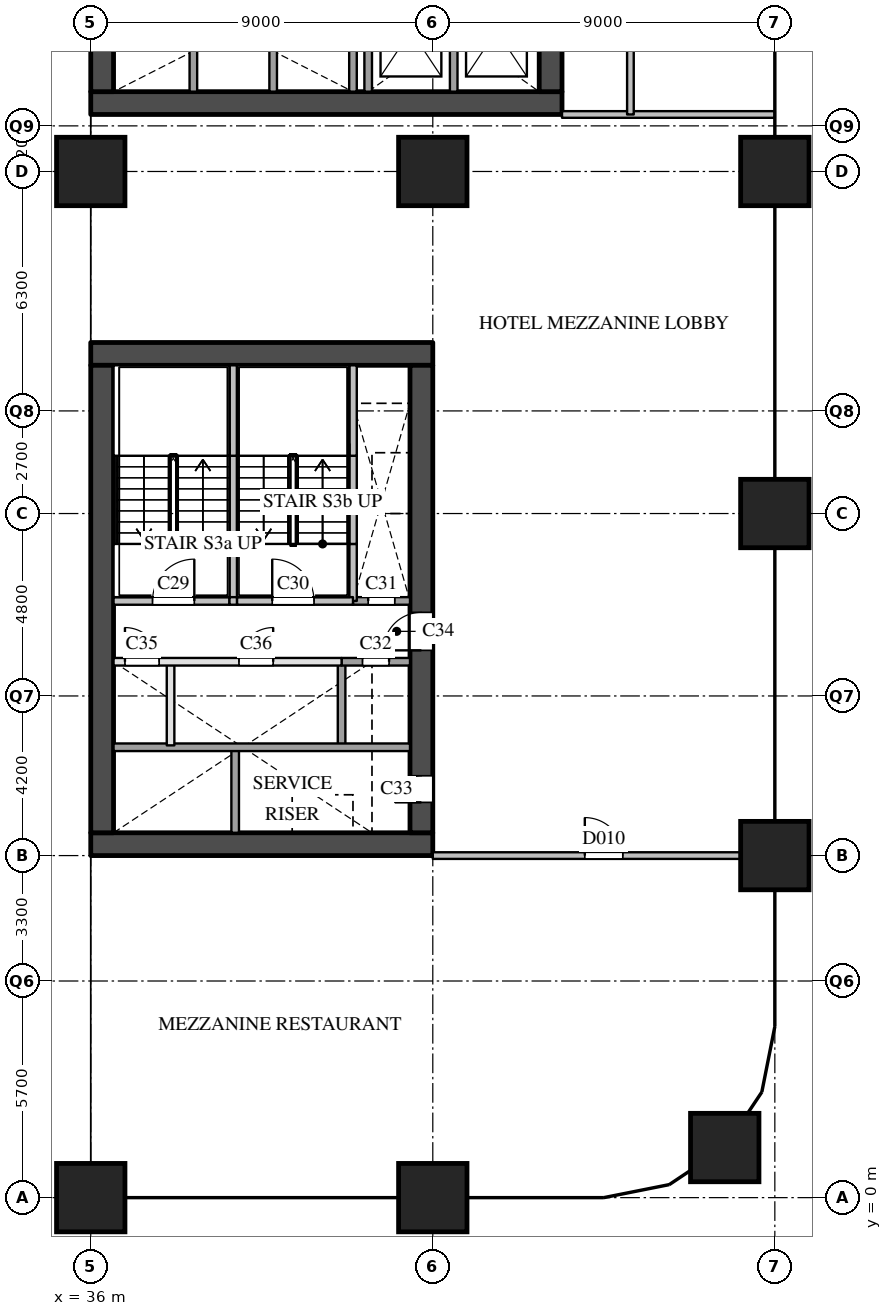
"""IFC4 building model, lengths in metres.
Left out: names, types, materials, properties, quantities, classifications, styles, units other than length and angle.
Written with IfcOpenShell. Run it as: python <this file> out.ifc"""

import sys

from ifc_helpers import new_model, si_unit, direction, frame, frame_2d, origin, origin_2d, place, context, subcontext, project, spatial, rectangle, extrude, element, fill, save


model = new_model("IFC4")
c1 = context("Model", 3, precision=1e-05, world=origin(), true_north=direction((0.0, 1.0)))
c2 = subcontext(c1, "Body", "Model", "MODEL_VIEW")
j1 = project(units=[si_unit("LENGTHUNIT", "METRE"), si_unit("PLANEANGLEUNIT", "RADIAN")], contexts=[c1])
p1 = place(None, origin())
s1 = spatial("IfcSite", under=j1, at=p1, CompositionType="ELEMENT")
p2 = place(p1, origin())
s2 = spatial("IfcBuilding", under=s1, at=p2, CompositionType="ELEMENT")
p3 = place(p2, frame((0.0, 0.0, 8.0)))
s3 = spatial("IfcBuildingStorey", under=s2, at=p3, CompositionType="ELEMENT", Elevation=8.0)
for number, where, z_axis, x_axis in (
    (1, (36.0, 0.0, 0.0), (0.0, 0.0, 1.0), (1.0, 0.0, 0.0)),
    (2, (36.0, 27.0, 0.0), (0.0, 0.0, 1.0), (1.0, 0.0, 0.0)),
    (3, (45.0, 0.0, 0.0), (0.0, 0.0, 1.0), (1.0, 0.0, 0.0)),
    (4, (45.0, 27.0, 0.0), (0.0, 0.0, 1.0), (1.0, 0.0, 0.0)),
    (5, (52.682, 1.318, 0.0), (0.0, 0.0, 1.0), (1.0, 0.0, 0.0)),
    (6, (54.0, 9.0, 0.0), (0.0, 0.0, 1.0), (1.0, 0.0, 0.0)),
    (7, (54.0, 18.0, 0.0), (0.0, 0.0, 1.0), (1.0, 0.0, 0.0)),
    (8, (54.0, 27.0, 0.0), (0.0, 0.0, 1.0), (1.0, 0.0, 0.0)),
):
    element("IfcColumn", number, at=place(p3, frame(where, z_axis=z_axis, x_axis=x_axis)), inside=s3, PredefinedType="COLUMN", context=c2, shape_type="SweptSolid", body=[
        extrude(rectangle(XDim=1.8, YDim=1.8, at=origin_2d()), origin(), (0.0, 0.0, 1.0), 6.0),
    ])
p4 = place(p3, frame((36.0, 28.8, 0.0), z_axis=(0.0, 0.0, 1.0), x_axis=(1.0, 0.0, 0.0)))
e9 = element("IfcWall", 9, at=p4, inside=s3, PredefinedType="SHEAR", context=c2, shape_type="SweptSolid", body=[
    extrude(rectangle(XDim=12.4, YDim=0.6, at=frame_2d((6.2, 0.0))), origin(), (0.0, 0.0, 1.0), 5.59),
])
p5 = place(p3, frame((36.3, 29.1, 0.0), z_axis=(0.0, 0.0, 1.0), x_axis=(0.0, 1.0, 0.0)))
e10 = element("IfcWall", 10, at=p5, inside=s3, PredefinedType="SHEAR", context=c2, shape_type="SweptSolid", body=[
    extrude(rectangle(XDim=20.3, YDim=0.6, at=frame_2d((10.15, 0.0))), origin(), (0.0, 0.0, 1.0), 5.59),
])
p6 = place(p3, frame((48.1, 29.1, 0.0), z_axis=(0.0, 0.0, 1.0), x_axis=(0.0, 1.0, 0.0)))
e11 = element("IfcWall", 11, at=p6, inside=s3, PredefinedType="SHEAR", context=c2, shape_type="SweptSolid", body=[
    extrude(rectangle(XDim=20.3, YDim=0.6, at=frame_2d((10.15, 0.0))), origin(), (0.0, 0.0, 1.0), 5.59),
])
p7 = place(p6, frame((12.5, 0.0, 0.0)))
e12 = element("IfcOpeningElement", 12, at=p7, cuts=e11, PredefinedType="OPENING", context=c2, shape_type="SweptSolid", body=[
    extrude(rectangle(XDim=0.7, YDim=2.1, at=frame_2d((0.35, 1.05))), frame((0.0, 0.31, 0.0), z_axis=(0.0, -1.0, 0.0), x_axis=(1.0, 0.0, 0.0)), (0.0, 0.0, 1.0), 0.62),
])
p8 = place(p6, frame((3.9, 0.0, 0.0)))
e13 = element("IfcOpeningElement", 13, at=p8, cuts=e11, PredefinedType="OPENING", context=c2, shape_type="SweptSolid", body=[
    extrude(rectangle(XDim=1.8, YDim=2.1, at=frame_2d((0.9, 1.05))), frame((0.0, 0.31, 0.0), z_axis=(0.0, -1.0, 0.0), x_axis=(1.0, 0.0, 0.0)), (0.0, 0.0, 1.0), 0.62),
])
p9 = place(p6, frame((16.4, 0.0, 0.0)))
e14 = element("IfcOpeningElement", 14, at=p9, cuts=e11, PredefinedType="OPENING", context=c2, shape_type="SweptSolid", body=[
    extrude(rectangle(XDim=1.0, YDim=2.1, at=frame_2d((0.5, 1.05))), frame((0.0, 0.31, 0.0), z_axis=(0.0, -1.0, 0.0), x_axis=(1.0, 0.0, 0.0)), (0.0, 0.0, 1.0), 0.62),
])
for number, where, z_axis, x_axis in (
    (15, (38.7, 29.1, 0.0), (0.0, 0.0, 1.0), (0.0, 1.0, 0.0)),
    (16, (40.8, 29.1, 0.0), (0.0, 0.0, 1.0), (0.0, 1.0, 0.0)),
    (17, (42.9, 29.1, 0.0), (0.0, 0.0, 1.0), (0.0, 1.0, 0.0)),
):
    element("IfcWall", number, at=place(p3, frame(where, z_axis=z_axis, x_axis=x_axis)), inside=s3, PredefinedType="SOLIDWALL", context=c2, shape_type="SweptSolid", body=[
        extrude(rectangle(XDim=3.2, YDim=0.2, at=frame_2d((1.6, 0.0))), origin(), (0.0, 0.0, 1.0), 5.59),
    ])
p10 = place(p3, frame((43.3, 29.1, 0.0), z_axis=(0.0, 0.0, 1.0), x_axis=(0.0, 1.0, 0.0)))
e18 = element("IfcWall", 18, at=p10, inside=s3, PredefinedType="SOLIDWALL", context=c2, shape_type="SweptSolid", body=[
    extrude(rectangle(XDim=9.9, YDim=0.2, at=frame_2d((4.95, 0.0))), origin(), (0.0, 0.0, 1.0), 5.59),
])
p11 = place(p10, frame((3.6, 0.0, 0.0)))
e19 = element("IfcOpeningElement", 19, at=p11, cuts=e18, PredefinedType="OPENING", context=c2, shape_type="SweptSolid", body=[
    extrude(rectangle(XDim=1.8, YDim=2.1, at=frame_2d((0.9, 1.05))), frame((0.0, 0.11, 0.0), z_axis=(0.0, -1.0, 0.0), x_axis=(1.0, 0.0, 0.0)), (0.0, 0.0, 1.0), 0.22),
])
p12 = place(p3, frame((45.55, 29.1, 0.0), z_axis=(0.0, 0.0, 1.0), x_axis=(0.0, 1.0, 0.0)))
e20 = element("IfcWall", 20, at=p12, inside=s3, PredefinedType="SOLIDWALL", context=c2, shape_type="SweptSolid", body=[
    extrude(rectangle(XDim=3.2, YDim=0.2, at=frame_2d((1.6, 0.0))), origin(), (0.0, 0.0, 1.0), 5.59),
])
for number, where, z_axis, x_axis in (
    (21, (36.0, 9.3, 0.0), (0.0, 0.0, 1.0), (1.0, 0.0, 0.0)),
    (22, (36.0, 22.2, 0.0), (0.0, 0.0, 1.0), (1.0, 0.0, 0.0)),
):
    element("IfcWall", number, at=place(p3, frame(where, z_axis=z_axis, x_axis=x_axis)), inside=s3, PredefinedType="SHEAR", context=c2, shape_type="SweptSolid", body=[
        extrude(rectangle(XDim=9.0, YDim=0.6, at=frame_2d((4.5, 0.0))), origin(), (0.0, 0.0, 1.0), 5.59),
    ])
p13 = place(p3, frame((36.3, 9.6, 0.0), z_axis=(0.0, 0.0, 1.0), x_axis=(0.0, 1.0, 0.0)))
e23 = element("IfcWall", 23, at=p13, inside=s3, PredefinedType="SHEAR", context=c2, shape_type="SweptSolid", body=[
    extrude(rectangle(XDim=12.3, YDim=0.6, at=frame_2d((6.15, 0.0))), origin(), (0.0, 0.0, 1.0), 5.59),
])
p14 = place(p3, frame((44.7, 9.6, 0.0), z_axis=(0.0, 0.0, 1.0), x_axis=(0.0, 1.0, 0.0)))
e24 = element("IfcWall", 24, at=p14, inside=s3, PredefinedType="SHEAR", context=c2, shape_type="SweptSolid", body=[
    extrude(rectangle(XDim=12.3, YDim=0.6, at=frame_2d((6.15, 0.0))), origin(), (0.0, 0.0, 1.0), 5.59),
])
p15 = place(p14, frame((0.8, 0.0, 0.0)))
e25 = element("IfcOpeningElement", 25, at=p15, cuts=e24, PredefinedType="OPENING", context=c2, shape_type="SweptSolid", body=[
    extrude(rectangle(XDim=0.7, YDim=2.1, at=frame_2d((0.35, 1.05))), frame((0.0, 0.31, 0.0), z_axis=(0.0, -1.0, 0.0), x_axis=(1.0, 0.0, 0.0)), (0.0, 0.0, 1.0), 0.62),
])
p16 = place(p14, frame((4.8, 0.0, 0.0)))
e26 = element("IfcOpeningElement", 26, at=p16, cuts=e24, PredefinedType="OPENING", context=c2, shape_type="SweptSolid", body=[
    extrude(rectangle(XDim=1.0, YDim=2.1, at=frame_2d((0.5, 1.05))), frame((0.0, 0.31, 0.0), z_axis=(0.0, -1.0, 0.0), x_axis=(1.0, 0.0, 0.0)), (0.0, 0.0, 1.0), 0.62),
])
p17 = place(p3, frame((38.1, 11.9, 0.0), z_axis=(0.0, 0.0, 1.0), x_axis=(0.0, 1.0, 0.0)))
e27 = element("IfcWall", 27, at=p17, inside=s3, PredefinedType="PARTITIONING", context=c2, shape_type="SweptSolid", body=[
    extrude(rectangle(XDim=2.2, YDim=0.2, at=frame_2d((1.1, 0.0))), origin(), (0.0, 0.0, 1.0), 5.59),
])
p18 = place(p3, frame((39.75, 15.7, 0.0), z_axis=(0.0, 0.0, 1.0), x_axis=(0.0, 1.0, 0.0)))
e28 = element("IfcWall", 28, at=p18, inside=s3, PredefinedType="SOLIDWALL", context=c2, shape_type="SweptSolid", body=[
    extrude(rectangle(XDim=1.5, YDim=0.2, at=frame_2d((0.75, 0.0))), origin(), (0.0, 0.0, 1.0), 5.59),
])
p19 = place(p3, frame((39.75, 17.2, 0.0), z_axis=(0.0, 0.0, 1.0), x_axis=(0.0, 1.0, 0.0)))
e29 = element("IfcWall", 29, at=p19, inside=s3, PredefinedType="SOLIDWALL", context=c2, shape_type="SweptSolid", body=[
    extrude(rectangle(XDim=2.32, YDim=0.2, at=frame_2d((1.16, 0.0))), origin(), (0.0, 0.0, 1.0), 5.59),
])
p20 = place(p3, frame((39.75, 19.52, 0.0), z_axis=(0.0, 0.0, 1.0), x_axis=(0.0, 1.0, 0.0)))
e30 = element("IfcWall", 30, at=p20, inside=s3, PredefinedType="SOLIDWALL", context=c2, shape_type="SweptSolid", body=[
    extrude(rectangle(XDim=2.38, YDim=0.2, at=frame_2d((1.19, 0.0))), origin(), (0.0, 0.0, 1.0), 5.59),
])
p21 = place(p3, frame((39.8, 9.6, 0.0), z_axis=(0.0, 0.0, 1.0), x_axis=(0.0, 1.0, 0.0)))
e31 = element("IfcWall", 31, at=p21, inside=s3, PredefinedType="SOLIDWALL", context=c2, shape_type="SweptSolid", body=[
    extrude(rectangle(XDim=2.3, YDim=0.2, at=frame_2d((1.15, 0.0))), origin(), (0.0, 0.0, 1.0), 5.59),
])
p22 = place(p3, frame((42.6, 11.9, 0.0), z_axis=(0.0, 0.0, 1.0), x_axis=(0.0, 1.0, 0.0)))
e32 = element("IfcWall", 32, at=p22, inside=s3, PredefinedType="SOLIDWALL", context=c2, shape_type="SweptSolid", body=[
    extrude(rectangle(XDim=2.2, YDim=0.2, at=frame_2d((1.1, 0.0))), origin(), (0.0, 0.0, 1.0), 5.59),
])
p23 = place(p3, frame((42.9, 15.7, 0.0), z_axis=(0.0, 0.0, 1.0), x_axis=(0.0, 1.0, 0.0)))
e33 = element("IfcWall", 33, at=p23, inside=s3, PredefinedType="SOLIDWALL", context=c2, shape_type="SweptSolid", body=[
    extrude(rectangle(XDim=1.5, YDim=0.2, at=frame_2d((0.75, 0.0))), origin(), (0.0, 0.0, 1.0), 5.59),
])
p24 = place(p3, frame((42.9, 17.2, 0.0), z_axis=(0.0, 0.0, 1.0), x_axis=(0.0, 1.0, 0.0)))
e34 = element("IfcWall", 34, at=p24, inside=s3, PredefinedType="SOLIDWALL", context=c2, shape_type="SweptSolid", body=[
    extrude(rectangle(XDim=2.32, YDim=0.2, at=frame_2d((1.16, 0.0))), origin(), (0.0, 0.0, 1.0), 5.59),
])
p25 = place(p3, frame((42.9, 19.52, 0.0), z_axis=(0.0, 0.0, 1.0), x_axis=(0.0, 1.0, 0.0)))
e35 = element("IfcWall", 35, at=p25, inside=s3, PredefinedType="SOLIDWALL", context=c2, shape_type="SweptSolid", body=[
    extrude(rectangle(XDim=2.38, YDim=0.2, at=frame_2d((1.19, 0.0))), origin(), (0.0, 0.0, 1.0), 5.59),
])
p26 = place(p3, frame((36.6, 11.85, 0.0), z_axis=(0.0, 0.0, 1.0), x_axis=(1.0, 0.0, 0.0)))
e36 = element("IfcWall", 36, at=p26, inside=s3, PredefinedType="SOLIDWALL", context=c2, shape_type="SweptSolid", body=[
    extrude(rectangle(XDim=7.8, YDim=0.2, at=frame_2d((3.9, 0.0))), origin(), (0.0, 0.0, 1.0), 5.59),
])
p27 = place(p3, frame((36.6, 14.1, 0.0), z_axis=(0.0, 0.0, 1.0), x_axis=(1.0, 0.0, 0.0)))
e37 = element("IfcWall", 37, at=p27, inside=s3, PredefinedType="PARTITIONING", context=c2, shape_type="SweptSolid", body=[
    extrude(rectangle(XDim=6.0, YDim=0.2, at=frame_2d((3.0, 0.0))), origin(), (0.0, 0.0, 1.0), 5.59),
])
p28 = place(p27, frame((0.3, 0.0, 0.0)))
e38 = element("IfcOpeningElement", 38, at=p28, cuts=e37, PredefinedType="OPENING", context=c2, shape_type="SweptSolid", body=[
    extrude(rectangle(XDim=0.9, YDim=2.1, at=frame_2d((0.45, 1.05))), frame((0.0, 0.11, 0.0), z_axis=(0.0, -1.0, 0.0), x_axis=(1.0, 0.0, 0.0)), (0.0, 0.0, 1.0), 0.22),
])
p29 = place(p27, frame((3.3, 0.0, 0.0)))
e39 = element("IfcOpeningElement", 39, at=p29, cuts=e37, PredefinedType="OPENING", context=c2, shape_type="SweptSolid", body=[
    extrude(rectangle(XDim=0.9, YDim=2.1, at=frame_2d((0.45, 1.05))), frame((0.0, 0.11, 0.0), z_axis=(0.0, -1.0, 0.0), x_axis=(1.0, 0.0, 0.0)), (0.0, 0.0, 1.0), 0.22),
])
p30 = place(p3, frame((42.6, 14.1, 0.0), z_axis=(0.0, 0.0, 1.0), x_axis=(1.0, 0.0, 0.0)))
e40 = element("IfcWall", 40, at=p30, inside=s3, PredefinedType="SOLIDWALL", context=c2, shape_type="SweptSolid", body=[
    extrude(rectangle(XDim=1.8, YDim=0.2, at=frame_2d((0.9, 0.0))), origin(), (0.0, 0.0, 1.0), 5.59),
])
p31 = place(p30, frame((0.55, 0.0, 0.0)))
e41 = element("IfcOpeningElement", 41, at=p31, cuts=e40, PredefinedType="OPENING", context=c2, shape_type="SweptSolid", body=[
    extrude(rectangle(XDim=0.7, YDim=2.1, at=frame_2d((0.35, 1.05))), frame((0.0, 0.11, 0.0), z_axis=(0.0, -1.0, 0.0), x_axis=(1.0, 0.0, 0.0)), (0.0, 0.0, 1.0), 0.22),
])
p32 = place(p3, frame((42.9, 15.7, 0.0), z_axis=(0.0, 0.0, 1.0), x_axis=(1.0, 0.0, 0.0)))
e42 = element("IfcWall", 42, at=p32, inside=s3, PredefinedType="SOLIDWALL", context=c2, shape_type="SweptSolid", body=[
    extrude(rectangle(XDim=1.5, YDim=0.2, at=frame_2d((0.75, 0.0))), origin(), (0.0, 0.0, 1.0), 5.59),
])
p33 = place(p32, frame((0.4, 0.0, 0.0)))
e43 = element("IfcOpeningElement", 43, at=p33, cuts=e42, PredefinedType="OPENING", context=c2, shape_type="SweptSolid", body=[
    extrude(rectangle(XDim=0.7, YDim=2.1, at=frame_2d((0.35, 1.05))), frame((0.0, 0.11, 0.0), z_axis=(0.0, -1.0, 0.0), x_axis=(1.0, 0.0, 0.0)), (0.0, 0.0, 1.0), 0.22),
])
p34 = place(p3, frame((36.6, 15.7, 0.0), z_axis=(0.0, 0.0, 1.0), x_axis=(1.0, 0.0, 0.0)))
e44 = element("IfcWall", 44, at=p34, inside=s3, PredefinedType="SOLIDWALL", context=c2, shape_type="SweptSolid", body=[
    extrude(rectangle(XDim=3.05, YDim=0.2, at=frame_2d((1.525, 0.0))), origin(), (0.0, 0.0, 1.0), 5.59),
])
p35 = place(p34, frame((1.025, 0.0, 0.0)))
e45 = element("IfcOpeningElement", 45, at=p35, cuts=e44, PredefinedType="OPENING", context=c2, shape_type="SweptSolid", body=[
    extrude(rectangle(XDim=1.1, YDim=2.1, at=frame_2d((0.55, 1.05))), frame((0.0, 0.11, 0.0), z_axis=(0.0, -1.0, 0.0), x_axis=(1.0, 0.0, 0.0)), (0.0, 0.0, 1.0), 0.22),
])
p36 = place(p3, frame((39.65, 15.7, 0.0), z_axis=(0.0, 0.0, 1.0), x_axis=(1.0, 0.0, 0.0)))
e46 = element("IfcWall", 46, at=p36, inside=s3, PredefinedType="SOLIDWALL", context=c2, shape_type="SweptSolid", body=[
    extrude(rectangle(XDim=0.2, YDim=0.2, at=frame_2d((0.1, 0.0))), origin(), (0.0, 0.0, 1.0), 5.59),
])
p37 = place(p3, frame((39.85, 15.7, 0.0), z_axis=(0.0, 0.0, 1.0), x_axis=(1.0, 0.0, 0.0)))
e47 = element("IfcWall", 47, at=p37, inside=s3, PredefinedType="SOLIDWALL", context=c2, shape_type="SweptSolid", body=[
    extrude(rectangle(XDim=3.05, YDim=0.2, at=frame_2d((1.525, 0.0))), origin(), (0.0, 0.0, 1.0), 5.59),
])
p38 = place(p37, frame((0.925, 0.0, 0.0)))
e48 = element("IfcOpeningElement", 48, at=p38, cuts=e47, PredefinedType="OPENING", context=c2, shape_type="SweptSolid", body=[
    extrude(rectangle(XDim=1.1, YDim=2.1, at=frame_2d((0.55, 1.05))), frame((0.0, 0.11, 0.0), z_axis=(0.0, -1.0, 0.0), x_axis=(1.0, 0.0, 0.0)), (0.0, 0.0, 1.0), 0.22),
])
p39 = place(p3, frame((45.0, 9.0, 0.0), z_axis=(0.0, 0.0, 1.0), x_axis=(1.0, 0.0, 0.0)))
e49 = element("IfcWall", 49, at=p39, inside=s3, PredefinedType="PARTITIONING", context=c2, shape_type="SweptSolid", body=[
    extrude(rectangle(XDim=9.0, YDim=0.175, at=frame_2d((4.5, 0.0))), origin(), (0.0, 0.0, 1.0), 5.59),
])
p40 = place(p39, frame((4.0, 0.0, 0.0)))
e50 = element("IfcOpeningElement", 50, at=p40, cuts=e49, PredefinedType="OPENING", context=c2, shape_type="SweptSolid", body=[
    extrude(rectangle(XDim=1.0, YDim=2.1, at=frame_2d((0.5, 1.05))), frame((0.0, 0.097, 0.0), z_axis=(0.0, -1.0, 0.0), x_axis=(1.0, 0.0, 0.0)), (0.0, 0.0, 1.0), 0.195),
])
p41 = place(p3, frame((48.4, 28.5, 0.0), z_axis=(0.0, 0.0, 1.0), x_axis=(1.0, 0.0, 0.0)))
e51 = element("IfcWall", 51, at=p41, inside=s3, PredefinedType="PARTITIONING", context=c2, shape_type="SweptSolid", body=[
    extrude(rectangle(XDim=5.6, YDim=0.175, at=frame_2d((2.8, 0.0))), origin(), (0.0, 0.0, 1.0), 4.59),
])
p42 = place(p3, frame((50.2, 28.5, 0.0), z_axis=(0.0, 0.0, 1.0), x_axis=(0.0, 1.0, 0.0)))
e52 = element("IfcWall", 52, at=p42, inside=s3, PredefinedType="PARTITIONING", context=c2, shape_type="SweptSolid", body=[
    extrude(rectangle(XDim=21.5, YDim=0.175, at=frame_2d((10.75, 0.0))), origin(), (0.0, 0.0, 1.0), 5.59),
])
p43 = place(p42, frame((5.25, 0.0, 0.0)))
e53 = element("IfcOpeningElement", 53, at=p43, cuts=e52, PredefinedType="OPENING", context=c2, shape_type="SweptSolid", body=[
    extrude(rectangle(XDim=1.0, YDim=2.1, at=frame_2d((0.5, 1.05))), frame((0.0, 0.097, 0.0), z_axis=(0.0, -1.0, 0.0), x_axis=(1.0, 0.0, 0.0)), (0.0, 0.0, 1.0), 0.195),
])
p44 = place(p42, frame((16.0, 0.0, 0.0)))
e54 = element("IfcOpeningElement", 54, at=p44, cuts=e52, PredefinedType="OPENING", context=c2, shape_type="SweptSolid", body=[
    extrude(rectangle(XDim=1.0, YDim=2.1, at=frame_2d((0.5, 1.05))), frame((0.0, 0.097, 0.0), z_axis=(0.0, -1.0, 0.0), x_axis=(1.0, 0.0, 0.0)), (0.0, 0.0, 1.0), 0.195),
])
p45 = place(p35, origin())
e55 = element("IfcDoor", 55, at=p45, inside=s3, OperationType="SINGLE_SWING_RIGHT", PredefinedType="DOOR", context=c2, shape_type="SweptSolid", body=[
    extrude(rectangle(XDim=1.1, YDim=2.1, at=frame_2d((0.55, 1.05))), frame((0.0, 0.025, 0.0), z_axis=(0.0, -1.0, 0.0), x_axis=(1.0, 0.0, 0.0)), (0.0, 0.0, 1.0), 0.05),
])
fill(e45, e55)
p46 = place(p38, origin())
e56 = element("IfcDoor", 56, at=p46, inside=s3, OperationType="SINGLE_SWING_LEFT", PredefinedType="DOOR", context=c2, shape_type="SweptSolid", body=[
    extrude(rectangle(XDim=1.1, YDim=2.1, at=frame_2d((0.55, 1.05))), frame((0.0, 0.025, 0.0), z_axis=(0.0, -1.0, 0.0), x_axis=(1.0, 0.0, 0.0)), (0.0, 0.0, 1.0), 0.05),
])
fill(e48, e56)
p47 = place(p33, origin())
e57 = element("IfcDoor", 57, at=p47, inside=s3, OperationType="SINGLE_SWING_LEFT", PredefinedType="DOOR", context=c2, shape_type="SweptSolid", body=[
    extrude(rectangle(XDim=0.7, YDim=2.1, at=frame_2d((0.35, 1.05))), frame((0.0, 0.025, 0.0), z_axis=(0.0, -1.0, 0.0), x_axis=(1.0, 0.0, 0.0)), (0.0, 0.0, 1.0), 0.05),
])
fill(e43, e57)
p48 = place(p31, origin())
e58 = element("IfcDoor", 58, at=p48, inside=s3, OperationType="SINGLE_SWING_RIGHT", PredefinedType="DOOR", context=c2, shape_type="SweptSolid", body=[
    extrude(rectangle(XDim=0.7, YDim=2.1, at=frame_2d((0.35, 1.05))), frame((0.0, 0.025, 0.0), z_axis=(0.0, -1.0, 0.0), x_axis=(1.0, 0.0, 0.0)), (0.0, 0.0, 1.0), 0.05),
])
fill(e41, e58)
p49 = place(p15, origin())
e59 = element("IfcDoor", 59, at=p49, inside=s3, OperationType="SINGLE_SWING_LEFT", PredefinedType="DOOR", context=c2, shape_type="SweptSolid", body=[
    extrude(rectangle(XDim=0.7, YDim=2.1, at=frame_2d((0.35, 1.05))), frame((0.0, 0.025, 0.0), z_axis=(0.0, -1.0, 0.0), x_axis=(1.0, 0.0, 0.0)), (0.0, 0.0, 1.0), 0.05),
])
fill(e25, e59)
p50 = place(p16, origin())
e60 = element("IfcDoor", 60, at=p50, inside=s3, OperationType="SINGLE_SWING_LEFT", PredefinedType="DOOR", context=c2, shape_type="SweptSolid", body=[
    extrude(rectangle(XDim=1.0, YDim=2.1, at=frame_2d((0.5, 1.05))), frame((0.0, 0.025, 0.0), z_axis=(0.0, -1.0, 0.0), x_axis=(1.0, 0.0, 0.0)), (0.0, 0.0, 1.0), 0.05),
])
fill(e26, e60)
p51 = place(p28, origin())
e61 = element("IfcDoor", 61, at=p51, inside=s3, OperationType="SINGLE_SWING_LEFT", PredefinedType="DOOR", context=c2, shape_type="SweptSolid", body=[
    extrude(rectangle(XDim=0.9, YDim=2.1, at=frame_2d((0.45, 1.05))), frame((0.0, 0.025, 0.0), z_axis=(0.0, -1.0, 0.0), x_axis=(1.0, 0.0, 0.0)), (0.0, 0.0, 1.0), 0.05),
])
fill(e38, e61)
p52 = place(p29, origin())
e62 = element("IfcDoor", 62, at=p52, inside=s3, OperationType="SINGLE_SWING_RIGHT", PredefinedType="DOOR", context=c2, shape_type="SweptSolid", body=[
    extrude(rectangle(XDim=0.9, YDim=2.1, at=frame_2d((0.45, 1.05))), frame((0.0, 0.025, 0.0), z_axis=(0.0, -1.0, 0.0), x_axis=(1.0, 0.0, 0.0)), (0.0, 0.0, 1.0), 0.05),
])
fill(e39, e62)
p53 = place(p40, origin())
e63 = element("IfcDoor", 63, at=p53, inside=s3, OperationType="SINGLE_SWING_LEFT", PredefinedType="DOOR", context=c2, shape_type="SweptSolid", body=[
    extrude(rectangle(XDim=1.0, YDim=2.1, at=frame_2d((0.5, 1.05))), frame((0.0, 0.025, 0.0), z_axis=(0.0, -1.0, 0.0), x_axis=(1.0, 0.0, 0.0)), (0.0, 0.0, 1.0), 0.05),
])
fill(e50, e63)
save(model, sys.argv[1])
